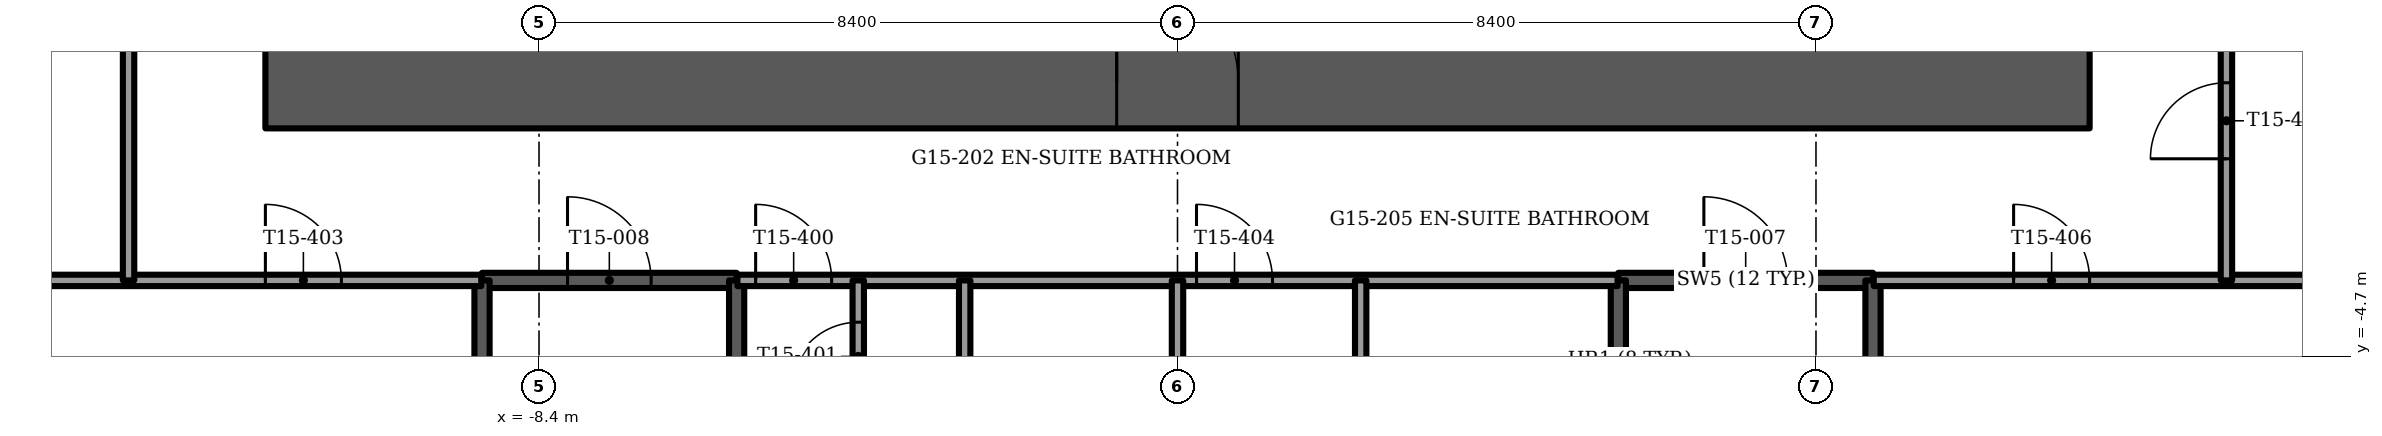
"""IFC4 building model, lengths in metres.
Left out: names, types, materials, properties, quantities, classifications, styles, units other than length and angle.
Written with IfcOpenShell. Run it as: python <this file> out.ifc"""

import sys

from ifc_helpers import new_model, si_unit, direction, frame, frame_2d, origin, place, context, subcontext, project, spatial, rectangle, extrude, element, fill, save


model = new_model("IFC4")
c1 = context("Model", 3, precision=1e-05, world=origin(), true_north=direction((0.0, 1.0)))
c2 = subcontext(c1, "Body", "Model", "MODEL_VIEW")
j1 = project(units=[si_unit("LENGTHUNIT", "METRE"), si_unit("PLANEANGLEUNIT", "RADIAN")], contexts=[c1])
p1 = place(None, origin())
s1 = spatial("IfcSite", under=j1, at=p1, CompositionType="ELEMENT")
p2 = place(p1, origin())
s2 = spatial("IfcBuilding", under=s1, at=p2, CompositionType="ELEMENT")
p3 = place(p2, frame((0.0, 0.0, 61.75)))
s3 = spatial("IfcBuildingStorey", under=s2, at=p3, CompositionType="ELEMENT", Elevation=61.75)
p4 = place(p3, frame((-12.0, -1.1, -0.3), z_axis=(0.0, 0.0, 1.0), x_axis=(1.0, 0.0, 0.0)))
e1 = element("IfcWall", 1, at=p4, inside=s3, PredefinedType="SHEAR", context=c2, shape_type="SweptSolid", body=[
    extrude(rectangle(XDim=24.0, YDim=1.2, at=frame_2d((12.0, 0.0))), origin(), (0.0, 0.0, 1.0), 3.75),
])
p5 = place(p4, frame((11.2, 0.0, 0.0)))
e2 = element("IfcOpeningElement", 2, at=p5, cuts=e1, PredefinedType="OPENING", context=c2, shape_type="SweptSolid", body=[
    extrude(rectangle(XDim=1.6, YDim=2.1, at=frame_2d((0.8, 1.05))), frame((0.0, 0.6, 0.0), z_axis=(0.0, -1.0, 0.0), x_axis=(1.0, 0.0, 0.0)), (0.0, 0.0, 1.0), 1.2),
])
p6 = place(p3, frame((-20.543, -1.269, 0.0), z_axis=(0.0, 0.0, 1.0), x_axis=(0.499995095024, -0.866028235655, 0.0)))
e3 = element("IfcWall", 3, at=p6, inside=s3, PredefinedType="SOLIDWALL", context=c2, shape_type="SweptSolid", body=[
    extrude(rectangle(XDim=18.345, YDim=0.15, at=frame_2d((9.172, 0.0))), origin(), (0.0, 0.0, 1.0), 3.45),
])
p7 = place(p6, frame((1.073, 0.0, 0.15)))
e4 = element("IfcOpeningElement", 4, at=p7, cuts=e3, PredefinedType="OPENING", context=c2, shape_type="SweptSolid", body=[
    extrude(rectangle(XDim=0.9, YDim=2.85, at=frame_2d((0.45, 1.425))), frame((0.0, 0.075, 0.0), z_axis=(0.0, -1.0, 0.0), x_axis=(1.0, 0.0, 0.0)), (0.0, 0.0, 1.0), 0.15),
])
p8 = place(p6, frame((3.172, 0.0, 0.15)))
e5 = element("IfcOpeningElement", 5, at=p8, cuts=e3, PredefinedType="OPENING", context=c2, shape_type="SweptSolid", body=[
    extrude(rectangle(XDim=1.5, YDim=2.85, at=frame_2d((0.75, 1.425))), frame((0.0, 0.075, 0.0), z_axis=(0.0, -1.0, 0.0), x_axis=(1.0, 0.0, 0.0)), (0.0, 0.0, 1.0), 0.15),
])
p9 = place(p6, frame((5.272, 0.0, 0.15)))
e6 = element("IfcOpeningElement", 6, at=p9, cuts=e3, PredefinedType="OPENING", context=c2, shape_type="SweptSolid", body=[
    extrude(rectangle(XDim=1.8, YDim=2.85, at=frame_2d((0.9, 1.425))), frame((0.0, 0.075, 0.0), z_axis=(0.0, -1.0, 0.0), x_axis=(1.0, 0.0, 0.0)), (0.0, 0.0, 1.0), 0.15),
])
p10 = place(p6, frame((7.372, 0.0, 0.15)))
e7 = element("IfcOpeningElement", 7, at=p10, cuts=e3, PredefinedType="OPENING", context=c2, shape_type="SweptSolid", body=[
    extrude(rectangle(XDim=1.5, YDim=2.85, at=frame_2d((0.75, 1.425))), frame((0.0, 0.075, 0.0), z_axis=(0.0, -1.0, 0.0), x_axis=(1.0, 0.0, 0.0)), (0.0, 0.0, 1.0), 0.15),
])
p11 = place(p6, frame((9.472, 0.0, 0.15)))
e8 = element("IfcOpeningElement", 8, at=p11, cuts=e3, PredefinedType="OPENING", context=c2, shape_type="SweptSolid", body=[
    extrude(rectangle(XDim=1.8, YDim=2.85, at=frame_2d((0.9, 1.425))), frame((0.0, 0.075, 0.0), z_axis=(0.0, -1.0, 0.0), x_axis=(1.0, 0.0, 0.0)), (0.0, 0.0, 1.0), 0.15),
])
p12 = place(p6, frame((11.573, 0.0, 0.15)))
e9 = element("IfcOpeningElement", 9, at=p12, cuts=e3, PredefinedType="OPENING", context=c2, shape_type="SweptSolid", body=[
    extrude(rectangle(XDim=1.5, YDim=2.85, at=frame_2d((0.75, 1.425))), frame((0.0, 0.075, 0.0), z_axis=(0.0, -1.0, 0.0), x_axis=(1.0, 0.0, 0.0)), (0.0, 0.0, 1.0), 0.15),
])
p13 = place(p6, frame((13.672, 0.0, 0.15)))
e10 = element("IfcOpeningElement", 10, at=p13, cuts=e3, PredefinedType="OPENING", context=c2, shape_type="SweptSolid", body=[
    extrude(rectangle(XDim=1.8, YDim=2.85, at=frame_2d((0.9, 1.425))), frame((0.0, 0.075, 0.0), z_axis=(0.0, -1.0, 0.0), x_axis=(1.0, 0.0, 0.0)), (0.0, 0.0, 1.0), 0.15),
])
p14 = place(p6, frame((15.772, 0.0, 0.15)))
e11 = element("IfcOpeningElement", 11, at=p14, cuts=e3, PredefinedType="OPENING", context=c2, shape_type="SweptSolid", body=[
    extrude(rectangle(XDim=1.5, YDim=2.85, at=frame_2d((0.75, 1.425))), frame((0.0, 0.075, 0.0), z_axis=(0.0, -1.0, 0.0), x_axis=(1.0, 0.0, 0.0)), (0.0, 0.0, 1.0), 0.15),
])
p15 = place(p3, frame((11.37, -17.156, 0.0), z_axis=(0.0, 0.0, 1.0), x_axis=(0.499995095024, 0.866028235655, 0.0)))
e12 = element("IfcWall", 12, at=p15, inside=s3, PredefinedType="SOLIDWALL", context=c2, shape_type="SweptSolid", body=[
    extrude(rectangle(XDim=18.345, YDim=0.15, at=frame_2d((9.172, 0.0))), origin(), (0.0, 0.0, 1.0), 3.45),
])
p16 = place(p15, frame((1.073, 0.0, 0.15)))
e13 = element("IfcOpeningElement", 13, at=p16, cuts=e12, PredefinedType="OPENING", context=c2, shape_type="SweptSolid", body=[
    extrude(rectangle(XDim=1.8, YDim=2.85, at=frame_2d((0.9, 1.425))), frame((0.0, 0.075, 0.0), z_axis=(0.0, -1.0, 0.0), x_axis=(1.0, 0.0, 0.0)), (0.0, 0.0, 1.0), 0.15),
])
p17 = place(p15, frame((3.172, 0.0, 0.0)))
e14 = element("IfcOpeningElement", 14, at=p17, cuts=e12, PredefinedType="OPENING", context=c2, shape_type="SweptSolid", body=[
    extrude(rectangle(XDim=1.5, YDim=2.4, at=frame_2d((0.75, 1.2))), frame((0.0, 0.075, 0.0), z_axis=(0.0, -1.0, 0.0), x_axis=(1.0, 0.0, 0.0)), (0.0, 0.0, 1.0), 0.15),
])
p18 = place(p15, frame((5.272, 0.0, 0.15)))
e15 = element("IfcOpeningElement", 15, at=p18, cuts=e12, PredefinedType="OPENING", context=c2, shape_type="SweptSolid", body=[
    extrude(rectangle(XDim=1.8, YDim=2.85, at=frame_2d((0.9, 1.425))), frame((0.0, 0.075, 0.0), z_axis=(0.0, -1.0, 0.0), x_axis=(1.0, 0.0, 0.0)), (0.0, 0.0, 1.0), 0.15),
])
p19 = place(p15, frame((7.372, 0.0, 0.0)))
e16 = element("IfcOpeningElement", 16, at=p19, cuts=e12, PredefinedType="OPENING", context=c2, shape_type="SweptSolid", body=[
    extrude(rectangle(XDim=1.5, YDim=2.4, at=frame_2d((0.75, 1.2))), frame((0.0, 0.075, 0.0), z_axis=(0.0, -1.0, 0.0), x_axis=(1.0, 0.0, 0.0)), (0.0, 0.0, 1.0), 0.15),
])
p20 = place(p15, frame((9.472, 0.0, 0.15)))
e17 = element("IfcOpeningElement", 17, at=p20, cuts=e12, PredefinedType="OPENING", context=c2, shape_type="SweptSolid", body=[
    extrude(rectangle(XDim=1.8, YDim=2.85, at=frame_2d((0.9, 1.425))), frame((0.0, 0.075, 0.0), z_axis=(0.0, -1.0, 0.0), x_axis=(1.0, 0.0, 0.0)), (0.0, 0.0, 1.0), 0.15),
])
p21 = place(p15, frame((11.573, 0.0, 0.0)))
e18 = element("IfcOpeningElement", 18, at=p21, cuts=e12, PredefinedType="OPENING", context=c2, shape_type="SweptSolid", body=[
    extrude(rectangle(XDim=1.5, YDim=2.4, at=frame_2d((0.75, 1.2))), frame((0.0, 0.075, 0.0), z_axis=(0.0, -1.0, 0.0), x_axis=(1.0, 0.0, 0.0)), (0.0, 0.0, 1.0), 0.15),
])
p22 = place(p15, frame((13.672, 0.0, 0.15)))
e19 = element("IfcOpeningElement", 19, at=p22, cuts=e12, PredefinedType="OPENING", context=c2, shape_type="SweptSolid", body=[
    extrude(rectangle(XDim=0.9, YDim=2.85, at=frame_2d((0.45, 1.425))), frame((0.0, 0.075, 0.0), z_axis=(0.0, -1.0, 0.0), x_axis=(1.0, 0.0, 0.0)), (0.0, 0.0, 1.0), 0.15),
])
p23 = place(p3, frame((5.8, -3.7, -0.3), z_axis=(0.0, 0.0, 1.0), x_axis=(1.0, 0.0, 0.0)))
e20 = element("IfcWall", 20, at=p23, inside=s3, PredefinedType="SOLIDWALL", context=c2, shape_type="SweptSolid", body=[
    extrude(rectangle(XDim=3.35, YDim=0.2, at=frame_2d((1.675, 0.0))), origin(), (0.0, 0.0, 1.0), 3.75),
])
p24 = place(p23, frame((1.125, 0.0, 0.0)))
e21 = element("IfcOpeningElement", 21, at=p24, cuts=e20, PredefinedType="OPENING", context=c2, shape_type="SweptSolid", body=[
    extrude(rectangle(XDim=1.1, YDim=2.1, at=frame_2d((0.55, 1.05))), frame((0.0, 0.1, 0.0), z_axis=(0.0, -1.0, 0.0), x_axis=(1.0, 0.0, 0.0)), (0.0, 0.0, 1.0), 0.2),
])
for number, where, z_axis, x_axis in (
    (22, (5.8, -3.7, -0.3), (0.0, 0.0, 1.0), (0.0, -1.0, 0.0)),
    (23, (9.15, -3.7, -0.3), (0.0, 0.0, 1.0), (0.0, -1.0, 0.0)),
):
    element("IfcWall", number, at=place(p3, frame(where, z_axis=z_axis, x_axis=x_axis)), inside=s3, PredefinedType="SOLIDWALL", context=c2, shape_type="SweptSolid", body=[
        extrude(rectangle(XDim=7.7, YDim=0.2, at=frame_2d((3.85, 0.0))), origin(), (0.0, 0.0, 1.0), 3.75),
    ])
p25 = place(p3, frame((-9.15, -3.7, -0.3), z_axis=(0.0, 0.0, 1.0), x_axis=(1.0, 0.0, 0.0)))
e24 = element("IfcWall", 24, at=p25, inside=s3, PredefinedType="SOLIDWALL", context=c2, shape_type="SweptSolid", body=[
    extrude(rectangle(XDim=3.35, YDim=0.2, at=frame_2d((1.675, 0.0))), origin(), (0.0, 0.0, 1.0), 3.75),
])
p26 = place(p25, frame((1.125, 0.0, 0.0)))
e25 = element("IfcOpeningElement", 25, at=p26, cuts=e24, PredefinedType="OPENING", context=c2, shape_type="SweptSolid", body=[
    extrude(rectangle(XDim=1.1, YDim=2.1, at=frame_2d((0.55, 1.05))), frame((0.0, 0.1, 0.0), z_axis=(0.0, -1.0, 0.0), x_axis=(1.0, 0.0, 0.0)), (0.0, 0.0, 1.0), 0.2),
])
for number, where, z_axis, x_axis in (
    (26, (-9.15, -3.7, -0.3), (0.0, 0.0, 1.0), (0.0, -1.0, 0.0)),
    (27, (-5.8, -3.7, -0.3), (0.0, 0.0, 1.0), (0.0, -1.0, 0.0)),
):
    element("IfcWall", number, at=place(p3, frame(where, z_axis=z_axis, x_axis=x_axis)), inside=s3, PredefinedType="SOLIDWALL", context=c2, shape_type="SweptSolid", body=[
        extrude(rectangle(XDim=7.7, YDim=0.2, at=frame_2d((3.85, 0.0))), origin(), (0.0, 0.0, 1.0), 3.75),
    ])
p27 = place(p3, frame((-19.191, -3.7, 0.0), z_axis=(0.0, 0.0, 1.0), x_axis=(1.0, 0.0, 0.0)))
e28 = element("IfcWall", 28, at=p27, inside=s3, PredefinedType="PARTITIONING", context=c2, shape_type="SweptSolid", body=[
    extrude(rectangle(XDim=10.031, YDim=0.15, at=frame_2d((5.016, 0.0))), origin(), (0.0, 0.0, 1.0), 3.45),
])
p28 = place(p27, frame((7.191, 0.0, 0.0)))
e29 = element("IfcOpeningElement", 29, at=p28, cuts=e28, PredefinedType="OPENING", context=c2, shape_type="SweptSolid", body=[
    extrude(rectangle(XDim=1.0, YDim=2.1, at=frame_2d((0.5, 1.05))), frame((0.0, 0.075, 0.0), z_axis=(0.0, -1.0, 0.0), x_axis=(1.0, 0.0, 0.0)), (0.0, 0.0, 1.0), 0.15),
])
p29 = place(p3, frame((-5.79, -3.7, 0.0), z_axis=(0.0, 0.0, 1.0), x_axis=(1.0, 0.0, 0.0)))
e30 = element("IfcWall", 30, at=p29, inside=s3, PredefinedType="PARTITIONING", context=c2, shape_type="SweptSolid", body=[
    extrude(rectangle(XDim=11.58, YDim=0.15, at=frame_2d((5.79, 0.0))), origin(), (0.0, 0.0, 1.0), 3.45),
])
p30 = place(p29, frame((0.24, 0.0, 0.0)))
e31 = element("IfcOpeningElement", 31, at=p30, cuts=e30, PredefinedType="OPENING", context=c2, shape_type="SweptSolid", body=[
    extrude(rectangle(XDim=1.0, YDim=2.1, at=frame_2d((0.5, 1.05))), frame((0.0, 0.075, 0.0), z_axis=(0.0, -1.0, 0.0), x_axis=(1.0, 0.0, 0.0)), (0.0, 0.0, 1.0), 0.15),
])
p31 = place(p29, frame((6.04, 0.0, 0.0)))
e32 = element("IfcOpeningElement", 32, at=p31, cuts=e30, PredefinedType="OPENING", context=c2, shape_type="SweptSolid", body=[
    extrude(rectangle(XDim=1.0, YDim=2.1, at=frame_2d((0.5, 1.05))), frame((0.0, 0.075, 0.0), z_axis=(0.0, -1.0, 0.0), x_axis=(1.0, 0.0, 0.0)), (0.0, 0.0, 1.0), 0.15),
])
p32 = place(p3, frame((9.16, -3.7, 0.0), z_axis=(0.0, 0.0, 1.0), x_axis=(1.0, 0.0, 0.0)))
e33 = element("IfcWall", 33, at=p32, inside=s3, PredefinedType="PARTITIONING", context=c2, shape_type="SweptSolid", body=[
    extrude(rectangle(XDim=10.031, YDim=0.15, at=frame_2d((5.016, 0.0))), origin(), (0.0, 0.0, 1.0), 3.45),
])
p33 = place(p32, frame((1.84, 0.0, 0.0)))
e34 = element("IfcOpeningElement", 34, at=p33, cuts=e33, PredefinedType="OPENING", context=c2, shape_type="SweptSolid", body=[
    extrude(rectangle(XDim=1.0, YDim=2.1, at=frame_2d((0.5, 1.05))), frame((0.0, 0.075, 0.0), z_axis=(0.0, -1.0, 0.0), x_axis=(1.0, 0.0, 0.0)), (0.0, 0.0, 1.0), 0.15),
])
p34 = place(p3, frame((13.8, -3.7, 0.0), z_axis=(0.0, 0.0, 1.0), x_axis=(0.0, 1.0, 0.0)))
e35 = element("IfcWall", 35, at=p34, inside=s3, PredefinedType="PARTITIONING", context=c2, shape_type="SweptSolid", body=[
    extrude(rectangle(XDim=15.265, YDim=0.15, at=frame_2d((7.632, 0.0))), origin(), (0.0, 0.0, 1.0), 3.45),
])
p35 = place(p34, frame((1.6, 0.0, 0.0)))
e36 = element("IfcOpeningElement", 36, at=p35, cuts=e35, PredefinedType="OPENING", context=c2, shape_type="SweptSolid", body=[
    extrude(rectangle(XDim=1.0, YDim=2.1, at=frame_2d((0.5, 1.05))), frame((0.0, 0.075, 0.0), z_axis=(0.0, -1.0, 0.0), x_axis=(1.0, 0.0, 0.0)), (0.0, 0.0, 1.0), 0.15),
])
p36 = place(p34, frame((4.45, 0.0, 0.0)))
e37 = element("IfcOpeningElement", 37, at=p36, cuts=e35, PredefinedType="OPENING", context=c2, shape_type="SweptSolid", body=[
    extrude(rectangle(XDim=1.0, YDim=2.1, at=frame_2d((0.5, 1.05))), frame((0.0, 0.075, 0.0), z_axis=(0.0, -1.0, 0.0), x_axis=(1.0, 0.0, 0.0)), (0.0, 0.0, 1.0), 0.15),
])
p37 = place(p34, frame((11.212, 0.0, 0.0)))
e38 = element("IfcOpeningElement", 38, at=p37, cuts=e35, PredefinedType="OPENING", context=c2, shape_type="SweptSolid", body=[
    extrude(rectangle(XDim=1.0, YDim=2.1, at=frame_2d((0.5, 1.05))), frame((0.0, 0.075, 0.0), z_axis=(0.0, -1.0, 0.0), x_axis=(1.0, 0.0, 0.0)), (0.0, 0.0, 1.0), 0.15),
])
p38 = place(p3, frame((2.41, -7.3, 0.0), z_axis=(0.0, 0.0, 1.0), x_axis=(0.0, 1.0, 0.0)))
e39 = element("IfcWall", 39, at=p38, inside=s3, PredefinedType="PARTITIONING", context=c2, shape_type="SweptSolid", body=[
    extrude(rectangle(XDim=3.6, YDim=0.15, at=frame_2d((1.8, 0.0))), origin(), (0.0, 0.0, 1.0), 3.45),
])
p39 = place(p38, frame((1.4, 0.0, 0.0)))
e40 = element("IfcOpeningElement", 40, at=p39, cuts=e39, PredefinedType="OPENING", context=c2, shape_type="SweptSolid", body=[
    extrude(rectangle(XDim=0.8, YDim=2.1, at=frame_2d((0.4, 1.05))), frame((0.0, 0.075, 0.0), z_axis=(0.0, -1.0, 0.0), x_axis=(1.0, 0.0, 0.0)), (0.0, 0.0, 1.0), 0.15),
])
p40 = place(p3, frame((0.0, -17.734, 0.0), z_axis=(0.0, 0.0, 1.0), x_axis=(0.0, 1.0, 0.0)))
e41 = element("IfcWall", 41, at=p40, inside=s3, PredefinedType="PARTITIONING", context=c2, shape_type="SweptSolid", body=[
    extrude(rectangle(XDim=14.034, YDim=0.15, at=frame_2d((7.017, 0.0))), origin(), (0.0, 0.0, 1.0), 3.45),
])
p41 = place(p3, frame((-2.8, -7.3, 0.0), z_axis=(0.0, 0.0, 1.0), x_axis=(0.0, 1.0, 0.0)))
e42 = element("IfcWall", 42, at=p41, inside=s3, PredefinedType="PARTITIONING", context=c2, shape_type="SweptSolid", body=[
    extrude(rectangle(XDim=3.6, YDim=0.15, at=frame_2d((1.8, 0.0))), origin(), (0.0, 0.0, 1.0), 3.45),
])
p42 = place(p41, frame((1.4, 0.0, 0.0)))
e43 = element("IfcOpeningElement", 43, at=p42, cuts=e42, PredefinedType="OPENING", context=c2, shape_type="SweptSolid", body=[
    extrude(rectangle(XDim=0.8, YDim=2.1, at=frame_2d((0.4, 1.05))), frame((0.0, 0.075, 0.0), z_axis=(0.0, -1.0, 0.0), x_axis=(1.0, 0.0, 0.0)), (0.0, 0.0, 1.0), 0.15),
])
p43 = place(p3, frame((-4.2, -17.734, 0.0), z_axis=(0.0, 0.0, 1.0), x_axis=(0.0, 1.0, 0.0)))
e44 = element("IfcWall", 44, at=p43, inside=s3, PredefinedType="PARTITIONING", context=c2, shape_type="SweptSolid", body=[
    extrude(rectangle(XDim=14.034, YDim=0.15, at=frame_2d((7.017, 0.0))), origin(), (0.0, 0.0, 1.0), 3.45),
])
p44 = place(p43, frame((12.584, 0.0, 0.0)))
e45 = element("IfcOpeningElement", 45, at=p44, cuts=e44, PredefinedType="OPENING", context=c2, shape_type="SweptSolid", body=[
    extrude(rectangle(XDim=0.9, YDim=2.1, at=frame_2d((0.45, 1.05))), frame((0.0, 0.075, 0.0), z_axis=(0.0, -1.0, 0.0), x_axis=(1.0, 0.0, 0.0)), (0.0, 0.0, 1.0), 0.15),
])
p45 = place(p3, frame((-13.8, -3.7, 0.0), z_axis=(0.0, 0.0, 1.0), x_axis=(0.0, 1.0, 0.0)))
e46 = element("IfcWall", 46, at=p45, inside=s3, PredefinedType="PARTITIONING", context=c2, shape_type="SweptSolid", body=[
    extrude(rectangle(XDim=15.265, YDim=0.15, at=frame_2d((7.632, 0.0))), origin(), (0.0, 0.0, 1.0), 3.45),
])
p46 = place(p45, frame((4.263, 0.0, 0.0)))
e47 = element("IfcOpeningElement", 47, at=p46, cuts=e46, PredefinedType="OPENING", context=c2, shape_type="SweptSolid", body=[
    extrude(rectangle(XDim=1.0, YDim=2.1, at=frame_2d((0.5, 1.05))), frame((0.0, 0.075, 0.0), z_axis=(0.0, -1.0, 0.0), x_axis=(1.0, 0.0, 0.0)), (0.0, 0.0, 1.0), 0.15),
])
p47 = place(p45, frame((11.212, 0.0, 0.0)))
e48 = element("IfcOpeningElement", 48, at=p47, cuts=e46, PredefinedType="OPENING", context=c2, shape_type="SweptSolid", body=[
    extrude(rectangle(XDim=1.0, YDim=2.1, at=frame_2d((0.5, 1.05))), frame((0.0, 0.075, 0.0), z_axis=(0.0, -1.0, 0.0), x_axis=(1.0, 0.0, 0.0)), (0.0, 0.0, 1.0), 0.15),
])
p48 = place(p5, origin())
e49 = element("IfcDoor", 49, at=p48, inside=s3, OperationType="DOUBLE_DOOR_SINGLE_SWING", PredefinedType="DOOR", context=c2, shape_type="SweptSolid", body=[
    extrude(rectangle(XDim=1.6, YDim=2.1, at=frame_2d((0.8, 1.05))), frame((0.0, 0.025, 0.0), z_axis=(0.0, -1.0, 0.0), x_axis=(1.0, 0.0, 0.0)), (0.0, 0.0, 1.0), 0.05),
])
fill(e2, e49)
p49 = place(p24, origin())
e50 = element("IfcDoor", 50, at=p49, inside=s3, OperationType="SINGLE_SWING_LEFT", PredefinedType="DOOR", context=c2, shape_type="SweptSolid", body=[
    extrude(rectangle(XDim=1.1, YDim=2.1, at=frame_2d((0.55, 1.05))), frame((0.0, 0.025, 0.0), z_axis=(0.0, -1.0, 0.0), x_axis=(1.0, 0.0, 0.0)), (0.0, 0.0, 1.0), 0.05),
])
fill(e21, e50)
p50 = place(p26, origin())
e51 = element("IfcDoor", 51, at=p50, inside=s3, OperationType="SINGLE_SWING_LEFT", PredefinedType="DOOR", context=c2, shape_type="SweptSolid", body=[
    extrude(rectangle(XDim=1.1, YDim=2.1, at=frame_2d((0.55, 1.05))), frame((0.0, 0.025, 0.0), z_axis=(0.0, -1.0, 0.0), x_axis=(1.0, 0.0, 0.0)), (0.0, 0.0, 1.0), 0.05),
])
fill(e25, e51)
p51 = place(p30, origin())
e52 = element("IfcDoor", 52, at=p51, inside=s3, OperationType="SINGLE_SWING_LEFT", PredefinedType="DOOR", context=c2, shape_type="SweptSolid", body=[
    extrude(rectangle(XDim=1.0, YDim=2.1, at=frame_2d((0.5, 1.05))), frame((0.0, 0.025, 0.0), z_axis=(0.0, -1.0, 0.0), x_axis=(1.0, 0.0, 0.0)), (0.0, 0.0, 1.0), 0.05),
])
fill(e31, e52)
p52 = place(p44, origin())
e53 = element("IfcDoor", 53, at=p52, inside=s3, OperationType="SINGLE_SWING_RIGHT", PredefinedType="DOOR", context=c2, shape_type="SweptSolid", body=[
    extrude(rectangle(XDim=0.9, YDim=2.1, at=frame_2d((0.45, 1.05))), frame((0.0, 0.025, 0.0), z_axis=(0.0, -1.0, 0.0), x_axis=(1.0, 0.0, 0.0)), (0.0, 0.0, 1.0), 0.05),
])
fill(e45, e53)
p53 = place(p28, origin())
e54 = element("IfcDoor", 54, at=p53, inside=s3, OperationType="SINGLE_SWING_LEFT", PredefinedType="DOOR", context=c2, shape_type="SweptSolid", body=[
    extrude(rectangle(XDim=1.0, YDim=2.1, at=frame_2d((0.5, 1.05))), frame((0.0, 0.025, 0.0), z_axis=(0.0, -1.0, 0.0), x_axis=(1.0, 0.0, 0.0)), (0.0, 0.0, 1.0), 0.05),
])
fill(e29, e54)
p54 = place(p31, origin())
e55 = element("IfcDoor", 55, at=p54, inside=s3, OperationType="SINGLE_SWING_LEFT", PredefinedType="DOOR", context=c2, shape_type="SweptSolid", body=[
    extrude(rectangle(XDim=1.0, YDim=2.1, at=frame_2d((0.5, 1.05))), frame((0.0, 0.025, 0.0), z_axis=(0.0, -1.0, 0.0), x_axis=(1.0, 0.0, 0.0)), (0.0, 0.0, 1.0), 0.05),
])
fill(e32, e55)
p55 = place(p33, origin())
e56 = element("IfcDoor", 56, at=p55, inside=s3, OperationType="SINGLE_SWING_LEFT", PredefinedType="DOOR", context=c2, shape_type="SweptSolid", body=[
    extrude(rectangle(XDim=1.0, YDim=2.1, at=frame_2d((0.5, 1.05))), frame((0.0, 0.025, 0.0), z_axis=(0.0, -1.0, 0.0), x_axis=(1.0, 0.0, 0.0)), (0.0, 0.0, 1.0), 0.05),
])
fill(e34, e56)
p56 = place(p35, origin())
e57 = element("IfcDoor", 57, at=p56, inside=s3, OperationType="SINGLE_SWING_LEFT", PredefinedType="DOOR", context=c2, shape_type="SweptSolid", body=[
    extrude(rectangle(XDim=1.0, YDim=2.1, at=frame_2d((0.5, 1.05))), frame((0.0, 0.025, 0.0), z_axis=(0.0, -1.0, 0.0), x_axis=(1.0, 0.0, 0.0)), (0.0, 0.0, 1.0), 0.05),
])
fill(e36, e57)
save(model, sys.argv[1])
